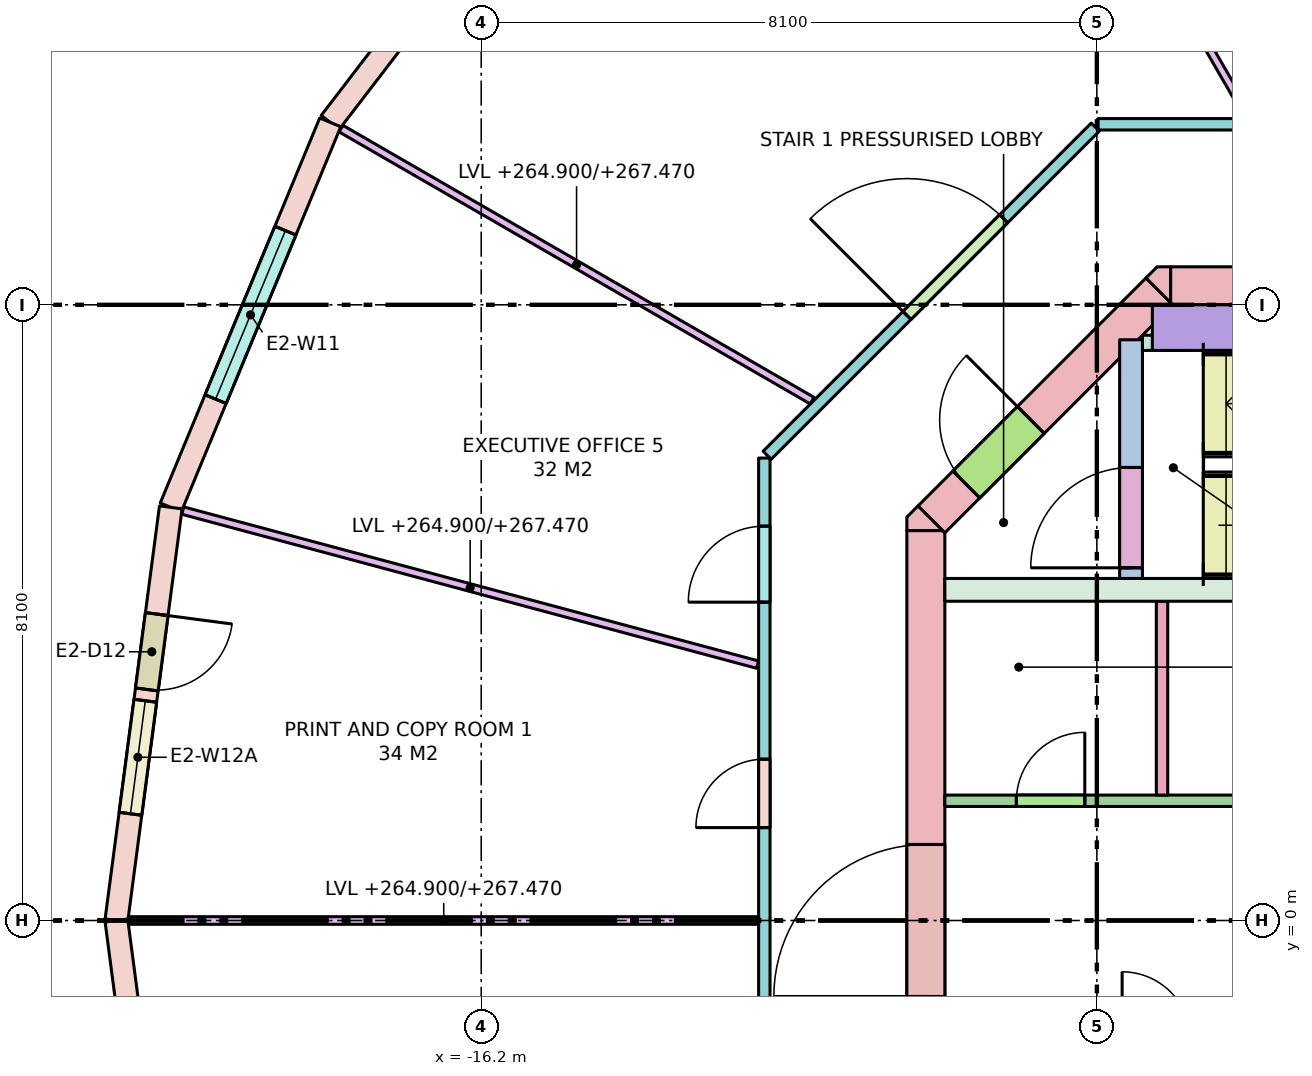
"""IFC4 building model, lengths in metres.
Left out: names, types, materials, properties, quantities, classifications, styles, units other than length and angle.
Written with IfcOpenShell. Run it as: python <this file> out.ifc"""

import sys

from ifc_helpers import new_model, si_unit, direction, frame, frame_2d, origin, place, context, subcontext, project, spatial, polyline, rectangle, outline, extrude, element, fill, save


model = new_model("IFC4")
c1 = context("Model", 3, precision=1e-05, world=origin(), true_north=direction((0.0, 1.0)))
c2 = subcontext(c1, "Body", "Model", "MODEL_VIEW")
j1 = project(units=[si_unit("LENGTHUNIT", "METRE"), si_unit("PLANEANGLEUNIT", "RADIAN")], contexts=[c1])
p1 = place(None, origin())
s1 = spatial("IfcSite", under=j1, at=p1, CompositionType="ELEMENT")
p2 = place(p1, origin())
s2 = spatial("IfcBuilding", under=s1, at=p2, CompositionType="ELEMENT")
p3 = place(p2, frame((0.0, 0.0, 264.9)))
s3 = spatial("IfcBuildingStorey", under=s2, at=p3, CompositionType="ELEMENT", Elevation=264.9)
p4 = place(p3, frame((-7.13, 8.35, -0.28), z_axis=(0.0, 0.0, 1.0), x_axis=(1.0, 0.0, 0.0)))
e1 = element("IfcWall", 1, at=p4, inside=s3, PredefinedType="SHEAR", context=c2, shape_type="SweptSolid", body=[
    extrude(rectangle(XDim=14.26, YDim=0.5, at=frame_2d((7.13, 0.0))), origin(), (0.0, 0.0, 1.0), 3.7),
])
p5 = place(p4, frame((5.48, 0.0, 0.28)))
e2 = element("IfcOpeningElement", 2, at=p5, cuts=e1, PredefinedType="OPENING", context=c2, shape_type="SweptSolid", body=[
    extrude(rectangle(XDim=0.7, YDim=2.1, at=frame_2d((0.35, 1.05))), frame((0.0, 0.26, 0.0), z_axis=(0.0, -1.0, 0.0), x_axis=(1.0, 0.0, 0.0)), (0.0, 0.0, 1.0), 0.52),
])
p6 = place(p4, frame((7.155, 0.0, 0.28)))
e3 = element("IfcOpeningElement", 3, at=p6, cuts=e1, PredefinedType="OPENING", context=c2, shape_type="SweptSolid", body=[
    extrude(rectangle(XDim=0.9, YDim=2.1, at=frame_2d((0.45, 1.05))), frame((0.0, 0.26, 0.0), z_axis=(0.0, -1.0, 0.0), x_axis=(1.0, 0.0, 0.0)), (0.0, 0.0, 1.0), 0.52),
])
p7 = place(p3, frame((-10.35, -5.13, -0.28), z_axis=(0.0, 0.0, 1.0), x_axis=(0.0, 1.0, 0.0)))
e4 = element("IfcWall", 4, at=p7, inside=s3, PredefinedType="SHEAR", context=c2, shape_type="SweptSolid", body=[
    extrude(rectangle(XDim=10.26, YDim=0.5, at=frame_2d((5.13, 0.0))), origin(), (0.0, 0.0, 1.0), 3.7),
])
p8 = place(p7, frame((4.13, 0.0, 0.28)))
e5 = element("IfcOpeningElement", 5, at=p8, cuts=e4, PredefinedType="OPENING", context=c2, shape_type="SweptSolid", body=[
    extrude(rectangle(XDim=2.0, YDim=2.1, at=frame_2d((1.0, 1.05))), frame((0.0, 0.26, 0.0), z_axis=(0.0, -1.0, 0.0), x_axis=(1.0, 0.0, 0.0)), (0.0, 0.0, 1.0), 0.52),
])
p9 = place(p3, frame((-10.277, 5.277, -0.28), z_axis=(0.0, 0.0, 1.0), x_axis=(0.707106781187, 0.707106781187, 0.0)))
e6 = element("IfcWall", 6, at=p9, inside=s3, PredefinedType="SHEAR", context=c2, shape_type="SweptSolid", body=[
    extrude(rectangle(XDim=4.243, YDim=0.5, at=frame_2d((2.121, 0.0))), origin(), (0.0, 0.0, 1.0), 3.7),
])
p10 = place(p9, frame((0.65, 0.0, 0.28)))
e7 = element("IfcOpeningElement", 7, at=p10, cuts=e6, PredefinedType="OPENING", context=c2, shape_type="SweptSolid", body=[
    extrude(rectangle(XDim=1.2, YDim=2.1, at=frame_2d((0.6, 1.05))), frame((0.0, 0.26, 0.0), z_axis=(0.0, -1.0, 0.0), x_axis=(1.0, 0.0, 0.0)), (0.0, 0.0, 1.0), 0.52),
])
p11 = place(p3, frame((0.0, 0.0, -0.28)))
e8 = element("IfcWall", 8, at=p11, inside=s3, PredefinedType="SHEAR", context=c2, shape_type="SweptSolid", body=[
    extrude(outline(polyline([(-10.454, 5.454), (-10.13, 5.13), (-10.6, 5.13), (-10.6, 5.307), (-10.454, 5.454)])), origin(), (0.0, 0.0, 1.0), 3.7),
])
p12 = place(p3, frame((0.0, 0.0, -0.28)))
e9 = element("IfcWall", 9, at=p12, inside=s3, PredefinedType="SHEAR", context=c2, shape_type="SweptSolid", body=[
    extrude(outline(polyline([(-7.307, 8.6), (-7.13, 8.6), (-7.13, 8.13), (-7.454, 8.454), (-7.307, 8.6)])), origin(), (0.0, 0.0, 1.0), 3.7),
])
p13 = place(p3, frame((-10.1, 4.35, 0.0), z_axis=(0.0, 0.0, 1.0), x_axis=(1.0, 0.0, 0.0)))
e10 = element("IfcWall", 10, at=p13, inside=s3, PredefinedType="SOLIDWALL", context=c2, shape_type="SweptSolid", body=[
    extrude(rectangle(XDim=8.1, YDim=0.3, at=frame_2d((4.05, 0.0))), origin(), (0.0, 0.0, 1.0), 3.42),
])
p14 = place(p3, frame((-7.65, 4.5, 0.0), z_axis=(0.0, 0.0, 1.0), x_axis=(0.0, 1.0, 0.0)))
e11 = element("IfcWall", 11, at=p14, inside=s3, PredefinedType="SHEAR", context=c2, shape_type="SweptSolid", body=[
    extrude(rectangle(XDim=3.14, YDim=0.3, at=frame_2d((1.57, 0.0))), origin(), (0.0, 0.0, 1.0), 3.42),
])
p15 = place(p14, frame((0.14, 0.0, 0.0)))
e12 = element("IfcOpeningElement", 12, at=p15, cuts=e11, PredefinedType="OPENING", context=c2, shape_type="SweptSolid", body=[
    extrude(rectangle(XDim=1.32, YDim=2.1, at=frame_2d((0.66, 1.05))), frame((0.0, 0.16, 0.0), z_axis=(0.0, -1.0, 0.0), x_axis=(1.0, 0.0, 0.0)), (0.0, 0.0, 1.0), 0.32),
])
p16 = place(p3, frame((-7.37, 7.8, 0.0), z_axis=(0.0, 0.0, 1.0), x_axis=(1.0, 0.0, 0.0)))
e13 = element("IfcWall", 13, at=p16, inside=s3, PredefinedType="SHEAR", context=c2, shape_type="SweptSolid", body=[
    extrude(rectangle(XDim=5.37, YDim=0.6, at=frame_2d((2.685, 0.0))), origin(), (0.0, 0.0, 1.0), 3.42),
])
p17 = place(p3, frame((-7.5, 7.6, 0.0), z_axis=(0.0, 0.0, 1.0), x_axis=(1.0, 0.0, 0.0)))
e14 = element("IfcWall", 14, at=p17, inside=s3, PredefinedType="SHEAR", context=c2, shape_type="SweptSolid", body=[
    extrude(rectangle(XDim=0.6, YDim=0.2, at=frame_2d((0.3, 0.0))), origin(), (0.0, 0.0, 1.0), 3.42),
])
p18 = place(p3, frame((-14.849, 14.849, 0.0), z_axis=(0.0, 0.0, 1.0), x_axis=(-0.608784891166, -0.793335336593, 0.0)))
e15 = element("IfcWall", 15, at=p18, inside=s3, PredefinedType="STANDARD", context=c2, shape_type="SweptSolid", body=[
    extrude(rectangle(XDim=5.482, YDim=0.3, at=frame_2d((2.741, 0.0))), origin(), (0.0, 0.0, 1.0), 3.42),
])
p19 = place(p18, frame((1.416, 0.0, 0.0)))
e16 = element("IfcOpeningElement", 16, at=p19, cuts=e15, PredefinedType="OPENING", context=c2, shape_type="SweptSolid", body=[
    extrude(rectangle(XDim=1.0, YDim=2.4, at=frame_2d((0.5, 1.2))), frame((0.0, 0.16, 0.0), z_axis=(0.0, -1.0, 0.0), x_axis=(1.0, 0.0, 0.0)), (0.0, 0.0, 1.0), 0.32),
])
p20 = place(p18, frame((2.566, 0.0, 0.8)))
e17 = element("IfcOpeningElement", 17, at=p20, cuts=e15, PredefinedType="OPENING", context=c2, shape_type="SweptSolid", body=[
    extrude(rectangle(XDim=1.5, YDim=2.4, at=frame_2d((0.75, 1.2))), frame((0.0, 0.16, 0.0), z_axis=(0.0, -1.0, 0.0), x_axis=(1.0, 0.0, 0.0)), (0.0, 0.0, 1.0), 0.32),
])
p21 = place(p3, frame((-18.187, 10.5, 0.0), z_axis=(0.0, 0.0, 1.0), x_axis=(-0.382688740813, -0.923877333662, 0.0)))
e18 = element("IfcWall", 18, at=p21, inside=s3, PredefinedType="STANDARD", context=c2, shape_type="SweptSolid", body=[
    extrude(rectangle(XDim=5.482, YDim=0.3, at=frame_2d((2.741, 0.0))), origin(), (0.0, 0.0, 1.0), 3.42),
])
p22 = place(p21, frame((1.541, 0.0, 0.8)))
e19 = element("IfcOpeningElement", 19, at=p22, cuts=e18, PredefinedType="OPENING", context=c2, shape_type="SweptSolid", body=[
    extrude(rectangle(XDim=2.4, YDim=2.4, at=frame_2d((1.2, 1.2))), frame((0.0, 0.16, 0.0), z_axis=(0.0, -1.0, 0.0), x_axis=(1.0, 0.0, 0.0)), (0.0, 0.0, 1.0), 0.32),
])
p23 = place(p3, frame((-20.284, 5.435, 0.0), z_axis=(0.0, 0.0, 1.0), x_axis=(-0.130527087244, -0.991444743541, 0.0)))
e20 = element("IfcWall", 20, at=p23, inside=s3, PredefinedType="STANDARD", context=c2, shape_type="SweptSolid", body=[
    extrude(rectangle(XDim=5.482, YDim=0.3, at=frame_2d((2.741, 0.0))), origin(), (0.0, 0.0, 1.0), 3.42),
])
p24 = place(p23, frame((1.416, 0.0, 0.0)))
e21 = element("IfcOpeningElement", 21, at=p24, cuts=e20, PredefinedType="OPENING", context=c2, shape_type="SweptSolid", body=[
    extrude(rectangle(XDim=1.0, YDim=2.4, at=frame_2d((0.5, 1.2))), frame((0.0, 0.16, 0.0), z_axis=(0.0, -1.0, 0.0), x_axis=(1.0, 0.0, 0.0)), (0.0, 0.0, 1.0), 0.32),
])
p25 = place(p23, frame((2.566, 0.0, 0.8)))
e22 = element("IfcOpeningElement", 22, at=p25, cuts=e20, PredefinedType="OPENING", context=c2, shape_type="SweptSolid", body=[
    extrude(rectangle(XDim=1.5, YDim=2.4, at=frame_2d((0.75, 1.2))), frame((0.0, 0.16, 0.0), z_axis=(0.0, -1.0, 0.0), x_axis=(1.0, 0.0, 0.0)), (0.0, 0.0, 1.0), 0.32),
])
p26 = place(p3, frame((-21.0, 0.0, 0.0), z_axis=(0.0, 0.0, 1.0), x_axis=(0.130527087244, -0.991444743541, 0.0)))
e23 = element("IfcWall", 23, at=p26, inside=s3, PredefinedType="STANDARD", context=c2, shape_type="SweptSolid", body=[
    extrude(rectangle(XDim=5.482, YDim=0.3, at=frame_2d((2.741, 0.0))), origin(), (0.0, 0.0, 1.0), 3.42),
])
p27 = place(p26, frame((1.541, 0.0, 0.8)))
e24 = element("IfcOpeningElement", 24, at=p27, cuts=e23, PredefinedType="OPENING", context=c2, shape_type="SweptSolid", body=[
    extrude(rectangle(XDim=2.4, YDim=2.4, at=frame_2d((1.2, 1.2))), frame((0.0, 0.16, 0.0), z_axis=(0.0, -1.0, 0.0), x_axis=(1.0, 0.0, 0.0)), (0.0, 0.0, 1.0), 0.32),
])
p28 = place(p3, frame((-7.242, 1.65, 0.0), z_axis=(0.0, 0.0, 1.0), x_axis=(0.0, 1.0, 0.0)))
e25 = element("IfcWall", 25, at=p28, inside=s3, PredefinedType="PARTITIONING", context=c2, shape_type="SweptSolid", body=[
    extrude(rectangle(XDim=2.55, YDim=0.15, at=frame_2d((1.275, 0.0))), origin(), (0.0, 0.0, 1.0), 3.42),
])
p29 = place(p3, frame((-10.1, 1.575, 0.0), z_axis=(0.0, 0.0, 1.0), x_axis=(1.0, 0.0, 0.0)))
e26 = element("IfcWall", 26, at=p29, inside=s3, PredefinedType="PARTITIONING", context=c2, shape_type="SweptSolid", body=[
    extrude(rectangle(XDim=8.1, YDim=0.15, at=frame_2d((4.05, 0.0))), origin(), (0.0, 0.0, 1.0), 3.42),
])
p30 = place(p29, frame((0.941, 0.0, 0.0)))
e27 = element("IfcOpeningElement", 27, at=p30, cuts=e26, PredefinedType="OPENING", context=c2, shape_type="SweptSolid", body=[
    extrude(rectangle(XDim=0.9, YDim=2.1, at=frame_2d((0.45, 1.05))), frame((0.0, 0.085, 0.0), z_axis=(0.0, -1.0, 0.0), x_axis=(1.0, 0.0, 0.0)), (0.0, 0.0, 1.0), 0.17),
])
p31 = place(p29, frame((5.066, 0.0, 0.0)))
e28 = element("IfcOpeningElement", 28, at=p31, cuts=e26, PredefinedType="OPENING", context=c2, shape_type="SweptSolid", body=[
    extrude(rectangle(XDim=0.9, YDim=2.1, at=frame_2d((0.45, 1.05))), frame((0.0, 0.085, 0.0), z_axis=(0.0, -1.0, 0.0), x_axis=(1.0, 0.0, 0.0)), (0.0, 0.0, 1.0), 0.17),
])
p32 = place(p3, frame((-12.475, -6.084, 0.0), z_axis=(0.0, 0.0, 1.0), x_axis=(0.0, 1.0, 0.0)))
e29 = element("IfcWall", 29, at=p32, inside=s3, PredefinedType="PARTITIONING", context=c2, shape_type="SweptSolid", body=[
    extrude(rectangle(XDim=12.167, YDim=0.15, at=frame_2d((6.084, 0.0))), origin(), (0.0, 0.0, 1.0), 2.57),
])
p33 = place(p32, frame((10.272, 0.0, 0.0)))
e30 = element("IfcOpeningElement", 30, at=p33, cuts=e29, PredefinedType="OPENING", context=c2, shape_type="SweptSolid", body=[
    extrude(rectangle(XDim=1.0, YDim=2.1, at=frame_2d((0.5, 1.05))), frame((0.0, 0.085, 0.0), z_axis=(0.0, -1.0, 0.0), x_axis=(1.0, 0.0, 0.0)), (0.0, 0.0, 1.0), 0.17),
])
p34 = place(p32, frame((7.306, 0.0, 0.0)))
e31 = element("IfcOpeningElement", 31, at=p34, cuts=e29, PredefinedType="OPENING", context=c2, shape_type="SweptSolid", body=[
    extrude(rectangle(XDim=0.9, YDim=2.1, at=frame_2d((0.45, 1.05))), frame((0.0, 0.085, 0.0), z_axis=(0.0, -1.0, 0.0), x_axis=(1.0, 0.0, 0.0)), (0.0, 0.0, 1.0), 0.17),
])
p35 = place(p32, frame((3.961, 0.0, 0.0)))
e32 = element("IfcOpeningElement", 32, at=p35, cuts=e29, PredefinedType="OPENING", context=c2, shape_type="SweptSolid", body=[
    extrude(rectangle(XDim=0.9, YDim=2.1, at=frame_2d((0.45, 1.05))), frame((0.0, 0.085, 0.0), z_axis=(0.0, -1.0, 0.0), x_axis=(1.0, 0.0, 0.0)), (0.0, 0.0, 1.0), 0.17),
])
p36 = place(p32, frame((0.896, 0.0, 0.0)))
e33 = element("IfcOpeningElement", 33, at=p36, cuts=e29, PredefinedType="OPENING", context=c2, shape_type="SweptSolid", body=[
    extrude(rectangle(XDim=1.0, YDim=2.1, at=frame_2d((0.5, 1.05))), frame((0.0, 0.085, 0.0), z_axis=(0.0, -1.0, 0.0), x_axis=(1.0, 0.0, 0.0)), (0.0, 0.0, 1.0), 0.17),
])
p37 = place(p3, frame((-12.438, 6.121, 0.0), z_axis=(0.0, 0.0, 1.0), x_axis=(0.707106781187, 0.707106781187, 0.0)))
e34 = element("IfcWall", 34, at=p37, inside=s3, PredefinedType="PARTITIONING", context=c2, shape_type="SweptSolid", body=[
    extrude(rectangle(XDim=6.105, YDim=0.15, at=frame_2d((3.053, 0.0))), origin(), (0.0, 0.0, 1.0), 2.57),
])
p38 = place(p37, frame((2.602, 0.0, 0.0)))
e35 = element("IfcOpeningElement", 35, at=p38, cuts=e34, PredefinedType="OPENING", context=c2, shape_type="SweptSolid", body=[
    extrude(rectangle(XDim=1.8, YDim=2.1, at=frame_2d((0.9, 1.05))), frame((0.0, 0.085, 0.0), z_axis=(0.0, -1.0, 0.0), x_axis=(1.0, 0.0, 0.0)), (0.0, 0.0, 1.0), 0.17),
])
p39 = place(p3, frame((-8.084, 10.475, 0.0), z_axis=(0.0, 0.0, 1.0), x_axis=(1.0, 0.0, 0.0)))
e36 = element("IfcWall", 36, at=p39, inside=s3, PredefinedType="PARTITIONING", context=c2, shape_type="SweptSolid", body=[
    extrude(rectangle(XDim=16.167, YDim=0.15, at=frame_2d((8.084, 0.0))), origin(), (0.0, 0.0, 1.0), 2.57),
])
p40 = place(p39, frame((13.004, 0.0, 0.0)))
e37 = element("IfcOpeningElement", 37, at=p40, cuts=e36, PredefinedType="OPENING", context=c2, shape_type="SweptSolid", body=[
    extrude(rectangle(XDim=1.0, YDim=2.1, at=frame_2d((0.5, 1.05))), frame((0.0, 0.085, 0.0), z_axis=(0.0, -1.0, 0.0), x_axis=(1.0, 0.0, 0.0)), (0.0, 0.0, 1.0), 0.17),
])
p41 = place(p39, frame((9.038, 0.0, 0.0)))
e38 = element("IfcOpeningElement", 38, at=p41, cuts=e36, PredefinedType="OPENING", context=c2, shape_type="SweptSolid", body=[
    extrude(rectangle(XDim=0.9, YDim=2.1, at=frame_2d((0.45, 1.05))), frame((0.0, 0.085, 0.0), z_axis=(0.0, -1.0, 0.0), x_axis=(1.0, 0.0, 0.0)), (0.0, 0.0, 1.0), 0.17),
])
p42 = place(p39, frame((4.556, 0.0, 0.0)))
e39 = element("IfcOpeningElement", 39, at=p42, cuts=e36, PredefinedType="OPENING", context=c2, shape_type="SweptSolid", body=[
    extrude(rectangle(XDim=1.0, YDim=2.1, at=frame_2d((0.5, 1.05))), frame((0.0, 0.085, 0.0), z_axis=(0.0, -1.0, 0.0), x_axis=(1.0, 0.0, 0.0)), (0.0, 0.0, 1.0), 0.17),
])
p43 = place(p3, frame((-6.105, 10.575, 0.0), z_axis=(0.0, 0.0, 1.0), x_axis=(-0.50001399067, 0.866017326117, 0.0)))
e40 = element("IfcWall", 40, at=p43, inside=s3, PredefinedType="PARTITIONING", context=c2, shape_type="SweptSolid", body=[
    extrude(rectangle(XDim=8.626, YDim=0.1, at=frame_2d((4.313, 0.0))), origin(), (0.0, 0.0, 1.0), 2.57),
])
p44 = place(p3, frame((-11.846, 6.839, 0.0), z_axis=(0.0, 0.0, 1.0), x_axis=(-0.866011787705, 0.500023583, 0.0)))
e41 = element("IfcWall", 41, at=p44, inside=s3, PredefinedType="PARTITIONING", context=c2, shape_type="SweptSolid", body=[
    extrude(rectangle(XDim=7.158, YDim=0.1, at=frame_2d((3.579, 0.0))), origin(), (0.0, 0.0, 1.0), 2.57),
])
p45 = place(p3, frame((-12.564, 3.367, 0.0), z_axis=(0.0, 0.0, 1.0), x_axis=(-0.965933576344, 0.258790119773, 0.0)))
e42 = element("IfcWall", 42, at=p45, inside=s3, PredefinedType="PARTITIONING", context=c2, shape_type="SweptSolid", body=[
    extrude(rectangle(XDim=7.829, YDim=0.1, at=frame_2d((3.915, 0.0))), origin(), (0.0, 0.0, 1.0), 2.57),
])
p46 = place(p3, frame((-12.55, 0.0, 0.0), z_axis=(0.0, 0.0, 1.0), x_axis=(-1.0, 0.0, 0.0)))
e43 = element("IfcWall", 43, at=p46, inside=s3, PredefinedType="PARTITIONING", context=c2, shape_type="SweptSolid", body=[
    extrude(rectangle(XDim=8.287, YDim=0.1, at=frame_2d((4.143, 0.0))), origin(), (0.0, 0.0, 1.0), 2.57),
])
p47 = place(p22, origin())
e44 = element("IfcWindow", 44, at=p47, inside=s3, PartitioningType="SINGLE_PANEL", PredefinedType="WINDOW", context=c2, shape_type="SweptSolid", body=[
    extrude(rectangle(XDim=2.4, YDim=2.4, at=frame_2d((1.2, 1.2))), frame((0.0, 0.03, 0.0), z_axis=(0.0, -1.0, 0.0), x_axis=(1.0, 0.0, 0.0)), (0.0, 0.0, 1.0), 0.06),
])
fill(e19, e44)
p48 = place(p24, origin())
e45 = element("IfcDoor", 45, at=p48, inside=s3, OperationType="SINGLE_SWING_LEFT", PredefinedType="DOOR", context=c2, shape_type="SweptSolid", body=[
    extrude(rectangle(XDim=1.0, YDim=2.4, at=frame_2d((0.5, 1.2))), frame((0.0, 0.025, 0.0), z_axis=(0.0, -1.0, 0.0), x_axis=(1.0, 0.0, 0.0)), (0.0, 0.0, 1.0), 0.05),
])
fill(e21, e45)
p49 = place(p25, origin())
e46 = element("IfcWindow", 46, at=p49, inside=s3, PartitioningType="SINGLE_PANEL", PredefinedType="WINDOW", context=c2, shape_type="SweptSolid", body=[
    extrude(rectangle(XDim=1.5, YDim=2.4, at=frame_2d((0.75, 1.2))), frame((0.0, 0.03, 0.0), z_axis=(0.0, -1.0, 0.0), x_axis=(1.0, 0.0, 0.0)), (0.0, 0.0, 1.0), 0.06),
])
fill(e22, e46)
p50 = place(p15, origin())
e47 = element("IfcDoor", 47, at=p50, inside=s3, OperationType="DOUBLE_DOOR_SINGLE_SWING", PredefinedType="DOOR", context=c2, shape_type="SweptSolid", body=[
    extrude(rectangle(XDim=1.32, YDim=2.1, at=frame_2d((0.66, 1.05))), frame((0.0, 0.025, 0.0), z_axis=(0.0, -1.0, 0.0), x_axis=(1.0, 0.0, 0.0)), (0.0, 0.0, 1.0), 0.05),
])
fill(e12, e47)
p51 = place(p10, origin())
e48 = element("IfcDoor", 48, at=p51, inside=s3, OperationType="SINGLE_SWING_RIGHT", PredefinedType="DOOR", context=c2, shape_type="SweptSolid", body=[
    extrude(rectangle(XDim=1.2, YDim=2.1, at=frame_2d((0.6, 1.05))), frame((0.0, 0.025, 0.0), z_axis=(0.0, -1.0, 0.0), x_axis=(1.0, 0.0, 0.0)), (0.0, 0.0, 1.0), 0.05),
])
fill(e7, e48)
p52 = place(p8, origin())
e49 = element("IfcDoor", 49, at=p52, inside=s3, OperationType="DOUBLE_DOOR_SINGLE_SWING", PredefinedType="DOOR", context=c2, shape_type="SweptSolid", body=[
    extrude(rectangle(XDim=2.0, YDim=2.1, at=frame_2d((1.0, 1.05))), frame((0.0, 0.025, 0.0), z_axis=(0.0, -1.0, 0.0), x_axis=(1.0, 0.0, 0.0)), (0.0, 0.0, 1.0), 0.05),
])
fill(e5, e49)
p53 = place(p30, origin())
e50 = element("IfcDoor", 50, at=p53, inside=s3, OperationType="SINGLE_SWING_RIGHT", PredefinedType="DOOR", context=c2, shape_type="SweptSolid", body=[
    extrude(rectangle(XDim=0.9, YDim=2.1, at=frame_2d((0.45, 1.05))), frame((0.0, 0.025, 0.0), z_axis=(0.0, -1.0, 0.0), x_axis=(1.0, 0.0, 0.0)), (0.0, 0.0, 1.0), 0.05),
])
fill(e27, e50)
p54 = place(p38, origin())
e51 = element("IfcDoor", 51, at=p54, inside=s3, OperationType="DOUBLE_DOOR_SINGLE_SWING", PredefinedType="DOOR", context=c2, shape_type="SweptSolid", body=[
    extrude(rectangle(XDim=1.8, YDim=2.1, at=frame_2d((0.9, 1.05))), frame((0.0, 0.025, 0.0), z_axis=(0.0, -1.0, 0.0), x_axis=(1.0, 0.0, 0.0)), (0.0, 0.0, 1.0), 0.05),
])
fill(e35, e51)
p55 = place(p33, origin())
e52 = element("IfcDoor", 52, at=p55, inside=s3, OperationType="SINGLE_SWING_LEFT", PredefinedType="DOOR", context=c2, shape_type="SweptSolid", body=[
    extrude(rectangle(XDim=1.0, YDim=2.1, at=frame_2d((0.5, 1.05))), frame((0.0, 0.025, 0.0), z_axis=(0.0, -1.0, 0.0), x_axis=(1.0, 0.0, 0.0)), (0.0, 0.0, 1.0), 0.05),
])
fill(e30, e52)
p56 = place(p34, origin())
e53 = element("IfcDoor", 53, at=p56, inside=s3, OperationType="SINGLE_SWING_LEFT", PredefinedType="DOOR", context=c2, shape_type="SweptSolid", body=[
    extrude(rectangle(XDim=0.9, YDim=2.1, at=frame_2d((0.45, 1.05))), frame((0.0, 0.025, 0.0), z_axis=(0.0, -1.0, 0.0), x_axis=(1.0, 0.0, 0.0)), (0.0, 0.0, 1.0), 0.05),
])
fill(e31, e53)
save(model, sys.argv[1])
